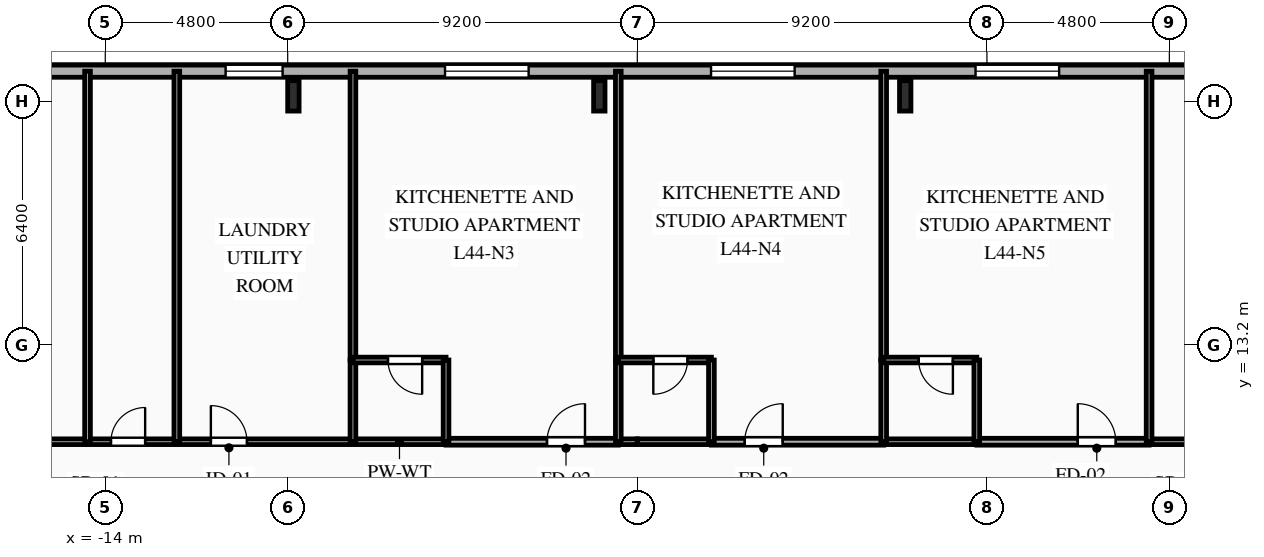
"""IFC4 building model, lengths in metres.
Left out: names, types, materials, properties, quantities, classifications, styles, units other than length and angle.
Written with IfcOpenShell. Run it as: python <this file> out.ifc"""

import sys

from ifc_helpers import new_model, si_unit, direction, frame, frame_2d, origin, origin_2d, place, context, subcontext, project, spatial, rectangle, i_section, extrude, element, fill, save


model = new_model("IFC4")
c1 = context("Model", 3, precision=1e-05, world=origin(), true_north=direction((0.0, 1.0)))
c2 = subcontext(c1, "Body", "Model", "MODEL_VIEW")
j1 = project(units=[si_unit("LENGTHUNIT", "METRE"), si_unit("PLANEANGLEUNIT", "RADIAN")], contexts=[c1])
p1 = place(None, origin())
s1 = spatial("IfcSite", under=j1, at=p1, CompositionType="ELEMENT")
p2 = place(p1, origin())
s2 = spatial("IfcBuilding", under=s1, at=p2, CompositionType="ELEMENT")
p3 = place(p2, frame((0.0, 0.0, 157.8)))
s3 = spatial("IfcBuildingStorey", under=s2, at=p3, CompositionType="ELEMENT", Elevation=157.8)
for number, where, z_axis, x_axis in (
    (1, (7.05, 19.75, 0.0), (0.0, 0.0, 1.0), (1.0, 0.0, 0.0)),
    (2, (-1.0, 19.75, 0.0), (0.0, 0.0, 1.0), (1.0, 0.0, 0.0)),
    (3, (-9.05, 19.75, 0.0), (0.0, 0.0, 1.0), (1.0, 0.0, 0.0)),
):
    element("IfcColumn", number, at=place(p3, frame(where, z_axis=z_axis, x_axis=x_axis)), inside=s3, PredefinedType="COLUMN", context=c2, shape_type="SweptSolid", body=[
        extrude(i_section(OverallWidth=0.3, OverallDepth=0.8, WebThickness=0.018, FlangeThickness=0.033, FilletRadius=0.03, at=origin_2d()), origin(), (0.0, 0.0, 1.0), 3.35),
    ])
p4 = place(p3, frame((-25.8, 20.4, 0.0), z_axis=(0.0, 0.0, 1.0), x_axis=(1.0, 0.0, 0.0)))
e4 = element("IfcWall", 4, at=p4, inside=s3, PredefinedType="SOLIDWALL", context=c2, shape_type="SweptSolid", body=[
    extrude(rectangle(XDim=49.6, YDim=0.32, at=frame_2d((24.8, 0.0))), origin(), (0.0, 0.0, 1.0), 3.04),
])
p5 = place(p4, frame((2.135, 0.0, 0.85)))
e5 = element("IfcOpeningElement", 5, at=p5, cuts=e4, PredefinedType="OPENING", context=c2, shape_type="SweptSolid", body=[
    extrude(rectangle(XDim=1.65, YDim=1.85, at=frame_2d((0.825, 0.925))), frame((0.0, 0.17, 0.0), z_axis=(0.0, -1.0, 0.0), x_axis=(1.0, 0.0, 0.0)), (0.0, 0.0, 1.0), 0.34),
])
p6 = place(p4, frame((6.706, 0.0, 0.85)))
e6 = element("IfcOpeningElement", 6, at=p6, cuts=e4, PredefinedType="OPENING", context=c2, shape_type="SweptSolid", body=[
    extrude(rectangle(XDim=1.65, YDim=1.85, at=frame_2d((0.825, 0.925))), frame((0.0, 0.17, 0.0), z_axis=(0.0, -1.0, 0.0), x_axis=(1.0, 0.0, 0.0)), (0.0, 0.0, 1.0), 0.34),
])
p7 = place(p4, frame((14.966, 0.0, 0.85)))
e7 = element("IfcOpeningElement", 7, at=p7, cuts=e4, PredefinedType="OPENING", context=c2, shape_type="SweptSolid", body=[
    extrude(rectangle(XDim=1.5, YDim=1.85, at=frame_2d((0.75, 0.925))), frame((0.0, 0.17, 0.0), z_axis=(0.0, -1.0, 0.0), x_axis=(1.0, 0.0, 0.0)), (0.0, 0.0, 1.0), 0.34),
])
p8 = place(p4, frame((20.74, 0.0, 0.85)))
e8 = element("IfcOpeningElement", 8, at=p8, cuts=e4, PredefinedType="OPENING", context=c2, shape_type="SweptSolid", body=[
    extrude(rectangle(XDim=2.2, YDim=1.85, at=frame_2d((1.1, 0.925))), frame((0.0, 0.17, 0.0), z_axis=(0.0, -1.0, 0.0), x_axis=(1.0, 0.0, 0.0)), (0.0, 0.0, 1.0), 0.34),
])
p9 = place(p4, frame((27.74, 0.0, 0.85)))
e9 = element("IfcOpeningElement", 9, at=p9, cuts=e4, PredefinedType="OPENING", context=c2, shape_type="SweptSolid", body=[
    extrude(rectangle(XDim=2.2, YDim=1.85, at=frame_2d((1.1, 0.925))), frame((0.0, 0.17, 0.0), z_axis=(0.0, -1.0, 0.0), x_axis=(1.0, 0.0, 0.0)), (0.0, 0.0, 1.0), 0.34),
])
p10 = place(p4, frame((34.7, 0.0, 0.85)))
e10 = element("IfcOpeningElement", 10, at=p10, cuts=e4, PredefinedType="OPENING", context=c2, shape_type="SweptSolid", body=[
    extrude(rectangle(XDim=2.2, YDim=1.85, at=frame_2d((1.1, 0.925))), frame((0.0, 0.17, 0.0), z_axis=(0.0, -1.0, 0.0), x_axis=(1.0, 0.0, 0.0)), (0.0, 0.0, 1.0), 0.34),
])
p11 = place(p4, frame((42.215, 0.0, 0.85)))
e11 = element("IfcOpeningElement", 11, at=p11, cuts=e4, PredefinedType="OPENING", context=c2, shape_type="SweptSolid", body=[
    extrude(rectangle(XDim=1.65, YDim=1.85, at=frame_2d((0.825, 0.925))), frame((0.0, 0.17, 0.0), z_axis=(0.0, -1.0, 0.0), x_axis=(1.0, 0.0, 0.0)), (0.0, 0.0, 1.0), 0.34),
])
p12 = place(p4, frame((47.45, 0.0, 0.85)))
e12 = element("IfcOpeningElement", 12, at=p12, cuts=e4, PredefinedType="OPENING", context=c2, shape_type="SweptSolid", body=[
    extrude(rectangle(XDim=1.1, YDim=1.85, at=frame_2d((0.55, 0.925))), frame((0.0, 0.17, 0.0), z_axis=(0.0, -1.0, 0.0), x_axis=(1.0, 0.0, 0.0)), (0.0, 0.0, 1.0), 0.34),
])
p13 = place(p3, frame((-20.95, 10.65, 0.0), z_axis=(0.0, 0.0, 1.0), x_axis=(1.0, 0.0, 0.0)))
e13 = element("IfcWall", 13, at=p13, inside=s3, PredefinedType="PARTITIONING", context=c2, shape_type="SweptSolid", body=[
    extrude(rectangle(XDim=6.483, YDim=0.15, at=frame_2d((3.241, 0.0))), origin(), (0.0, 0.0, 1.0), 3.04),
])
p14 = place(p13, frame((4.319, 0.0, 0.0)))
e14 = element("IfcOpeningElement", 14, at=p14, cuts=e13, PredefinedType="OPENING", context=c2, shape_type="SweptSolid", body=[
    extrude(rectangle(XDim=1.05, YDim=2.15, at=frame_2d((0.525, 1.075))), frame((0.0, 0.085, 0.0), z_axis=(0.0, -1.0, 0.0), x_axis=(1.0, 0.0, 0.0)), (0.0, 0.0, 1.0), 0.17),
])
p15 = place(p3, frame((-14.467, 10.65, 0.0), z_axis=(0.0, 0.0, 1.0), x_axis=(1.0, 0.0, 0.0)))
e15 = element("IfcWall", 15, at=p15, inside=s3, PredefinedType="PLUMBINGWALL", context=c2, shape_type="SweptSolid", body=[
    extrude(rectangle(XDim=2.35, YDim=0.15, at=frame_2d((1.175, 0.0))), origin(), (0.0, 0.0, 1.0), 3.04),
])
p16 = place(p15, frame((0.616, 0.0, 0.0)))
e16 = element("IfcOpeningElement", 16, at=p16, cuts=e15, PredefinedType="OPENING", context=c2, shape_type="SweptSolid", body=[
    extrude(rectangle(XDim=0.9, YDim=2.1, at=frame_2d((0.45, 1.05))), frame((0.0, 0.085, 0.0), z_axis=(0.0, -1.0, 0.0), x_axis=(1.0, 0.0, 0.0)), (0.0, 0.0, 1.0), 0.17),
])
p17 = place(p3, frame((-12.117, 10.65, 0.0), z_axis=(0.0, 0.0, 1.0), x_axis=(1.0, 0.0, 0.0)))
e17 = element("IfcWall", 17, at=p17, inside=s3, PredefinedType="PARTITIONING", context=c2, shape_type="SweptSolid", body=[
    extrude(rectangle(XDim=4.634, YDim=0.15, at=frame_2d((2.317, 0.0))), origin(), (0.0, 0.0, 1.0), 3.04),
])
p18 = place(p17, frame((0.896, 0.0, 0.0)))
e18 = element("IfcOpeningElement", 18, at=p18, cuts=e17, PredefinedType="OPENING", context=c2, shape_type="SweptSolid", body=[
    extrude(rectangle(XDim=0.95, YDim=2.1, at=frame_2d((0.475, 1.05))), frame((0.0, 0.085, 0.0), z_axis=(0.0, -1.0, 0.0), x_axis=(1.0, 0.0, 0.0)), (0.0, 0.0, 1.0), 0.17),
])
p19 = place(p3, frame((-5.033, 10.65, 0.0), z_axis=(0.0, 0.0, 1.0), x_axis=(1.0, 0.0, 0.0)))
e19 = element("IfcWall", 19, at=p19, inside=s3, PredefinedType="PARTITIONING", context=c2, shape_type="SweptSolid", body=[
    extrude(rectangle(XDim=4.533, YDim=0.18, at=frame_2d((2.267, 0.0))), origin(), (0.0, 0.0, 1.0), 3.04),
])
p20 = place(p19, frame((2.656, 0.0, 0.0)))
e20 = element("IfcOpeningElement", 20, at=p20, cuts=e19, PredefinedType="OPENING", context=c2, shape_type="SweptSolid", body=[
    extrude(rectangle(XDim=1.0, YDim=2.15, at=frame_2d((0.5, 1.075))), frame((0.0, 0.1, 0.0), z_axis=(0.0, -1.0, 0.0), x_axis=(1.0, 0.0, 0.0)), (0.0, 0.0, 1.0), 0.2),
])
p21 = place(p3, frame((-7.483, 10.65, 0.0), z_axis=(0.0, 0.0, 1.0), x_axis=(1.0, 0.0, 0.0)))
e21 = element("IfcWall", 21, at=p21, inside=s3, PredefinedType="PLUMBINGWALL", context=c2, shape_type="SweptSolid", body=[
    extrude(rectangle(XDim=2.45, YDim=0.15, at=frame_2d((1.225, 0.0))), origin(), (0.0, 0.0, 1.0), 3.04),
])
p22 = place(p3, frame((-0.5, 10.65, 0.0), z_axis=(0.0, 0.0, 1.0), x_axis=(1.0, 0.0, 0.0)))
e22 = element("IfcWall", 22, at=p22, inside=s3, PredefinedType="PLUMBINGWALL", context=c2, shape_type="SweptSolid", body=[
    extrude(rectangle(XDim=0.5, YDim=0.15, at=frame_2d((0.25, 0.0))), origin(), (0.0, 0.0, 1.0), 3.04),
])
p23 = place(p3, frame((1.95, 10.65, 0.0), z_axis=(0.0, 0.0, 1.0), x_axis=(1.0, 0.0, 0.0)))
e23 = element("IfcWall", 23, at=p23, inside=s3, PredefinedType="PARTITIONING", context=c2, shape_type="SweptSolid", body=[
    extrude(rectangle(XDim=4.533, YDim=0.18, at=frame_2d((2.267, 0.0))), origin(), (0.0, 0.0, 1.0), 3.04),
])
p24 = place(p23, frame((0.877, 0.0, 0.0)))
e24 = element("IfcOpeningElement", 24, at=p24, cuts=e23, PredefinedType="OPENING", context=c2, shape_type="SweptSolid", body=[
    extrude(rectangle(XDim=1.0, YDim=2.15, at=frame_2d((0.5, 1.075))), frame((0.0, 0.1, 0.0), z_axis=(0.0, -1.0, 0.0), x_axis=(1.0, 0.0, 0.0)), (0.0, 0.0, 1.0), 0.2),
])
p25 = place(p3, frame((0.0, 10.65, 0.0), z_axis=(0.0, 0.0, 1.0), x_axis=(1.0, 0.0, 0.0)))
e25 = element("IfcWall", 25, at=p25, inside=s3, PredefinedType="PLUMBINGWALL", context=c2, shape_type="SweptSolid", body=[
    extrude(rectangle(XDim=1.95, YDim=0.15, at=frame_2d((0.975, 0.0))), origin(), (0.0, 0.0, 1.0), 3.04),
])
p26 = place(p3, frame((8.933, 10.65, 0.0), z_axis=(0.0, 0.0, 1.0), x_axis=(1.0, 0.0, 0.0)))
e26 = element("IfcWall", 26, at=p26, inside=s3, PredefinedType="PARTITIONING", context=c2, shape_type="SweptSolid", body=[
    extrude(rectangle(XDim=4.534, YDim=0.18, at=frame_2d((2.267, 0.0))), origin(), (0.0, 0.0, 1.0), 3.04),
])
p27 = place(p26, frame((2.657, 0.0, 0.0)))
e27 = element("IfcOpeningElement", 27, at=p27, cuts=e26, PredefinedType="OPENING", context=c2, shape_type="SweptSolid", body=[
    extrude(rectangle(XDim=1.0, YDim=2.15, at=frame_2d((0.5, 1.075))), frame((0.0, 0.1, 0.0), z_axis=(0.0, -1.0, 0.0), x_axis=(1.0, 0.0, 0.0)), (0.0, 0.0, 1.0), 0.2),
])
p28 = place(p3, frame((6.483, 10.65, 0.0), z_axis=(0.0, 0.0, 1.0), x_axis=(1.0, 0.0, 0.0)))
e28 = element("IfcWall", 28, at=p28, inside=s3, PredefinedType="PLUMBINGWALL", context=c2, shape_type="SweptSolid", body=[
    extrude(rectangle(XDim=2.45, YDim=0.15, at=frame_2d((1.225, 0.0))), origin(), (0.0, 0.0, 1.0), 3.04),
])
p29 = place(p3, frame((13.467, 10.65, 0.0), z_axis=(0.0, 0.0, 1.0), x_axis=(1.0, 0.0, 0.0)))
e29 = element("IfcWall", 29, at=p29, inside=s3, PredefinedType="PARTITIONING", context=c2, shape_type="SweptSolid", body=[
    extrude(rectangle(XDim=7.483, YDim=0.15, at=frame_2d((3.741, 0.0))), origin(), (0.0, 0.0, 1.0), 3.04),
])
p30 = place(p29, frame((1.239, 0.0, 0.0)))
e30 = element("IfcOpeningElement", 30, at=p30, cuts=e29, PredefinedType="OPENING", context=c2, shape_type="SweptSolid", body=[
    extrude(rectangle(XDim=1.05, YDim=2.15, at=frame_2d((0.525, 1.075))), frame((0.0, 0.085, 0.0), z_axis=(0.0, -1.0, 0.0), x_axis=(1.0, 0.0, 0.0)), (0.0, 0.0, 1.0), 0.17),
])
for number, where, z_axis, x_axis in (
    (31, (-14.467, 20.4, 0.0), (0.0, 0.0, 1.0), (0.0, -1.0, 0.0)),
    (32, (-12.117, 20.4, 0.0), (0.0, 0.0, 1.0), (0.0, -1.0, 0.0)),
):
    element("IfcWall", number, at=place(p3, frame(where, z_axis=z_axis, x_axis=x_axis)), inside=s3, PredefinedType="PLUMBINGWALL", context=c2, shape_type="SweptSolid", body=[
        extrude(rectangle(XDim=9.75, YDim=0.15, at=frame_2d((4.875, 0.0))), origin(), (0.0, 0.0, 1.0), 3.04),
    ])
p31 = place(p3, frame((-7.483, 20.4, 0.0), z_axis=(0.0, 0.0, 1.0), x_axis=(0.0, -1.0, 0.0)))
e33 = element("IfcWall", 33, at=p31, inside=s3, PredefinedType="PARTITIONING", context=c2, shape_type="SweptSolid", body=[
    extrude(rectangle(XDim=7.6, YDim=0.15, at=frame_2d((3.8, 0.0))), origin(), (0.0, 0.0, 1.0), 3.04),
])
p32 = place(p3, frame((-7.483, 12.8, 0.0), z_axis=(0.0, 0.0, 1.0), x_axis=(0.0, -1.0, 0.0)))
e34 = element("IfcWall", 34, at=p32, inside=s3, PredefinedType="PLUMBINGWALL", context=c2, shape_type="SweptSolid", body=[
    extrude(rectangle(XDim=2.15, YDim=0.15, at=frame_2d((1.075, 0.0))), origin(), (0.0, 0.0, 1.0), 3.04),
])
p33 = place(p3, frame((-5.033, 12.8, 0.0), z_axis=(0.0, 0.0, 1.0), x_axis=(-1.0, 0.0, 0.0)))
e35 = element("IfcWall", 35, at=p33, inside=s3, PredefinedType="PLUMBINGWALL", context=c2, shape_type="SweptSolid", body=[
    extrude(rectangle(XDim=2.45, YDim=0.15, at=frame_2d((1.225, 0.0))), origin(), (0.0, 0.0, 1.0), 3.04),
])
p34 = place(p33, frame((0.629, 0.0, 0.0)))
e36 = element("IfcOpeningElement", 36, at=p34, cuts=e35, PredefinedType="OPENING", context=c2, shape_type="SweptSolid", body=[
    extrude(rectangle(XDim=0.9, YDim=2.1, at=frame_2d((0.45, 1.05))), frame((0.0, 0.085, 0.0), z_axis=(0.0, -1.0, 0.0), x_axis=(1.0, 0.0, 0.0)), (0.0, 0.0, 1.0), 0.17),
])
p35 = place(p3, frame((-5.033, 10.65, 0.0), z_axis=(0.0, 0.0, 1.0), x_axis=(0.0, 1.0, 0.0)))
e37 = element("IfcWall", 37, at=p35, inside=s3, PredefinedType="PLUMBINGWALL", context=c2, shape_type="SweptSolid", body=[
    extrude(rectangle(XDim=2.15, YDim=0.15, at=frame_2d((1.075, 0.0))), origin(), (0.0, 0.0, 1.0), 3.04),
])
p36 = place(p3, frame((-0.5, 20.4, 0.0), z_axis=(0.0, 0.0, 1.0), x_axis=(0.0, -1.0, 0.0)))
e38 = element("IfcWall", 38, at=p36, inside=s3, PredefinedType="PARTITIONING", context=c2, shape_type="SweptSolid", body=[
    extrude(rectangle(XDim=7.6, YDim=0.15, at=frame_2d((3.8, 0.0))), origin(), (0.0, 0.0, 1.0), 3.04),
])
p37 = place(p3, frame((-0.5, 12.8, 0.0), z_axis=(0.0, 0.0, 1.0), x_axis=(0.0, -1.0, 0.0)))
e39 = element("IfcWall", 39, at=p37, inside=s3, PredefinedType="PLUMBINGWALL", context=c2, shape_type="SweptSolid", body=[
    extrude(rectangle(XDim=2.15, YDim=0.15, at=frame_2d((1.075, 0.0))), origin(), (0.0, 0.0, 1.0), 3.04),
])
p38 = place(p3, frame((1.95, 12.8, 0.0), z_axis=(0.0, 0.0, 1.0), x_axis=(-1.0, 0.0, 0.0)))
e40 = element("IfcWall", 40, at=p38, inside=s3, PredefinedType="PLUMBINGWALL", context=c2, shape_type="SweptSolid", body=[
    extrude(rectangle(XDim=2.45, YDim=0.15, at=frame_2d((1.225, 0.0))), origin(), (0.0, 0.0, 1.0), 3.04),
])
p39 = place(p38, frame((0.629, 0.0, 0.0)))
e41 = element("IfcOpeningElement", 41, at=p39, cuts=e40, PredefinedType="OPENING", context=c2, shape_type="SweptSolid", body=[
    extrude(rectangle(XDim=0.9, YDim=2.1, at=frame_2d((0.45, 1.05))), frame((0.0, 0.085, 0.0), z_axis=(0.0, -1.0, 0.0), x_axis=(1.0, 0.0, 0.0)), (0.0, 0.0, 1.0), 0.17),
])
p40 = place(p3, frame((1.95, 10.65, 0.0), z_axis=(0.0, 0.0, 1.0), x_axis=(0.0, 1.0, 0.0)))
e42 = element("IfcWall", 42, at=p40, inside=s3, PredefinedType="PLUMBINGWALL", context=c2, shape_type="SweptSolid", body=[
    extrude(rectangle(XDim=2.15, YDim=0.15, at=frame_2d((1.075, 0.0))), origin(), (0.0, 0.0, 1.0), 3.04),
])
p41 = place(p3, frame((6.483, 20.4, 0.0), z_axis=(0.0, 0.0, 1.0), x_axis=(0.0, -1.0, 0.0)))
e43 = element("IfcWall", 43, at=p41, inside=s3, PredefinedType="PARTITIONING", context=c2, shape_type="SweptSolid", body=[
    extrude(rectangle(XDim=7.6, YDim=0.15, at=frame_2d((3.8, 0.0))), origin(), (0.0, 0.0, 1.0), 3.04),
])
p42 = place(p3, frame((6.483, 12.8, 0.0), z_axis=(0.0, 0.0, 1.0), x_axis=(0.0, -1.0, 0.0)))
e44 = element("IfcWall", 44, at=p42, inside=s3, PredefinedType="PLUMBINGWALL", context=c2, shape_type="SweptSolid", body=[
    extrude(rectangle(XDim=2.15, YDim=0.15, at=frame_2d((1.075, 0.0))), origin(), (0.0, 0.0, 1.0), 3.04),
])
p43 = place(p3, frame((8.933, 12.8, 0.0), z_axis=(0.0, 0.0, 1.0), x_axis=(-1.0, 0.0, 0.0)))
e45 = element("IfcWall", 45, at=p43, inside=s3, PredefinedType="PLUMBINGWALL", context=c2, shape_type="SweptSolid", body=[
    extrude(rectangle(XDim=2.45, YDim=0.15, at=frame_2d((1.225, 0.0))), origin(), (0.0, 0.0, 1.0), 3.04),
])
p44 = place(p43, frame((0.629, 0.0, 0.0)))
e46 = element("IfcOpeningElement", 46, at=p44, cuts=e45, PredefinedType="OPENING", context=c2, shape_type="SweptSolid", body=[
    extrude(rectangle(XDim=0.9, YDim=2.1, at=frame_2d((0.45, 1.05))), frame((0.0, 0.085, 0.0), z_axis=(0.0, -1.0, 0.0), x_axis=(1.0, 0.0, 0.0)), (0.0, 0.0, 1.0), 0.17),
])
p45 = place(p3, frame((8.933, 10.65, 0.0), z_axis=(0.0, 0.0, 1.0), x_axis=(0.0, 1.0, 0.0)))
e47 = element("IfcWall", 47, at=p45, inside=s3, PredefinedType="PLUMBINGWALL", context=c2, shape_type="SweptSolid", body=[
    extrude(rectangle(XDim=2.15, YDim=0.15, at=frame_2d((1.075, 0.0))), origin(), (0.0, 0.0, 1.0), 3.04),
])
p46 = place(p3, frame((13.467, 20.4, 0.0), z_axis=(0.0, 0.0, 1.0), x_axis=(0.0, -1.0, 0.0)))
e48 = element("IfcWall", 48, at=p46, inside=s3, PredefinedType="PARTITIONING", context=c2, shape_type="SweptSolid", body=[
    extrude(rectangle(XDim=9.75, YDim=0.15, at=frame_2d((4.875, 0.0))), origin(), (0.0, 0.0, 1.0), 3.04),
])
p47 = place(p7, origin())
e49 = element("IfcWindow", 49, at=p47, inside=s3, PartitioningType="SINGLE_PANEL", PredefinedType="WINDOW", context=c2, shape_type="SweptSolid", body=[
    extrude(rectangle(XDim=1.5, YDim=1.85, at=frame_2d((0.75, 0.925))), frame((0.0, 0.03, 0.0), z_axis=(0.0, -1.0, 0.0), x_axis=(1.0, 0.0, 0.0)), (0.0, 0.0, 1.0), 0.06),
])
fill(e7, e49)
p48 = place(p8, origin())
e50 = element("IfcWindow", 50, at=p48, inside=s3, PartitioningType="SINGLE_PANEL", PredefinedType="WINDOW", context=c2, shape_type="SweptSolid", body=[
    extrude(rectangle(XDim=2.2, YDim=1.85, at=frame_2d((1.1, 0.925))), frame((0.0, 0.03, 0.0), z_axis=(0.0, -1.0, 0.0), x_axis=(1.0, 0.0, 0.0)), (0.0, 0.0, 1.0), 0.06),
])
fill(e8, e50)
p49 = place(p9, origin())
e51 = element("IfcWindow", 51, at=p49, inside=s3, PartitioningType="SINGLE_PANEL", PredefinedType="WINDOW", context=c2, shape_type="SweptSolid", body=[
    extrude(rectangle(XDim=2.2, YDim=1.85, at=frame_2d((1.1, 0.925))), frame((0.0, 0.03, 0.0), z_axis=(0.0, -1.0, 0.0), x_axis=(1.0, 0.0, 0.0)), (0.0, 0.0, 1.0), 0.06),
])
fill(e9, e51)
p50 = place(p10, origin())
e52 = element("IfcWindow", 52, at=p50, inside=s3, PartitioningType="SINGLE_PANEL", PredefinedType="WINDOW", context=c2, shape_type="SweptSolid", body=[
    extrude(rectangle(XDim=2.2, YDim=1.85, at=frame_2d((1.1, 0.925))), frame((0.0, 0.03, 0.0), z_axis=(0.0, -1.0, 0.0), x_axis=(1.0, 0.0, 0.0)), (0.0, 0.0, 1.0), 0.06),
])
fill(e10, e52)
p51 = place(p16, origin())
e53 = element("IfcDoor", 53, at=p51, inside=s3, OperationType="SINGLE_SWING_RIGHT", PredefinedType="DOOR", context=c2, shape_type="SweptSolid", body=[
    extrude(rectangle(XDim=0.9, YDim=2.1, at=frame_2d((0.45, 1.05))), frame((0.0, 0.025, 0.0), z_axis=(0.0, -1.0, 0.0), x_axis=(1.0, 0.0, 0.0)), (0.0, 0.0, 1.0), 0.05),
])
fill(e16, e53)
p52 = place(p18, origin())
e54 = element("IfcDoor", 54, at=p52, inside=s3, OperationType="SINGLE_SWING_LEFT", PredefinedType="DOOR", context=c2, shape_type="SweptSolid", body=[
    extrude(rectangle(XDim=0.95, YDim=2.1, at=frame_2d((0.475, 1.05))), frame((0.0, 0.025, 0.0), z_axis=(0.0, -1.0, 0.0), x_axis=(1.0, 0.0, 0.0)), (0.0, 0.0, 1.0), 0.05),
])
fill(e18, e54)
p53 = place(p20, origin())
e55 = element("IfcDoor", 55, at=p53, inside=s3, OperationType="SINGLE_SWING_RIGHT", PredefinedType="DOOR", context=c2, shape_type="SweptSolid", body=[
    extrude(rectangle(XDim=1.0, YDim=2.15, at=frame_2d((0.5, 1.075))), frame((0.0, 0.025, 0.0), z_axis=(0.0, -1.0, 0.0), x_axis=(1.0, 0.0, 0.0)), (0.0, 0.0, 1.0), 0.05),
])
fill(e20, e55)
p54 = place(p24, origin())
e56 = element("IfcDoor", 56, at=p54, inside=s3, OperationType="SINGLE_SWING_RIGHT", PredefinedType="DOOR", context=c2, shape_type="SweptSolid", body=[
    extrude(rectangle(XDim=1.0, YDim=2.15, at=frame_2d((0.5, 1.075))), frame((0.0, 0.025, 0.0), z_axis=(0.0, -1.0, 0.0), x_axis=(1.0, 0.0, 0.0)), (0.0, 0.0, 1.0), 0.05),
])
fill(e24, e56)
p55 = place(p27, origin())
e57 = element("IfcDoor", 57, at=p55, inside=s3, OperationType="SINGLE_SWING_LEFT", PredefinedType="DOOR", context=c2, shape_type="SweptSolid", body=[
    extrude(rectangle(XDim=1.0, YDim=2.15, at=frame_2d((0.5, 1.075))), frame((0.0, 0.025, 0.0), z_axis=(0.0, -1.0, 0.0), x_axis=(1.0, 0.0, 0.0)), (0.0, 0.0, 1.0), 0.05),
])
fill(e27, e57)
p56 = place(p34, origin())
e58 = element("IfcDoor", 58, at=p56, inside=s3, OperationType="SINGLE_SWING_LEFT", PredefinedType="DOOR", context=c2, shape_type="SweptSolid", body=[
    extrude(rectangle(XDim=0.9, YDim=2.1, at=frame_2d((0.45, 1.05))), frame((0.0, 0.025, 0.0), z_axis=(0.0, -1.0, 0.0), x_axis=(1.0, 0.0, 0.0)), (0.0, 0.0, 1.0), 0.05),
])
fill(e36, e58)
p57 = place(p39, origin())
e59 = element("IfcDoor", 59, at=p57, inside=s3, OperationType="SINGLE_SWING_RIGHT", PredefinedType="DOOR", context=c2, shape_type="SweptSolid", body=[
    extrude(rectangle(XDim=0.9, YDim=2.1, at=frame_2d((0.45, 1.05))), frame((0.0, 0.025, 0.0), z_axis=(0.0, -1.0, 0.0), x_axis=(1.0, 0.0, 0.0)), (0.0, 0.0, 1.0), 0.05),
])
fill(e41, e59)
p58 = place(p44, origin())
e60 = element("IfcDoor", 60, at=p58, inside=s3, OperationType="SINGLE_SWING_LEFT", PredefinedType="DOOR", context=c2, shape_type="SweptSolid", body=[
    extrude(rectangle(XDim=0.9, YDim=2.1, at=frame_2d((0.45, 1.05))), frame((0.0, 0.025, 0.0), z_axis=(0.0, -1.0, 0.0), x_axis=(1.0, 0.0, 0.0)), (0.0, 0.0, 1.0), 0.05),
])
fill(e46, e60)
save(model, sys.argv[1])
